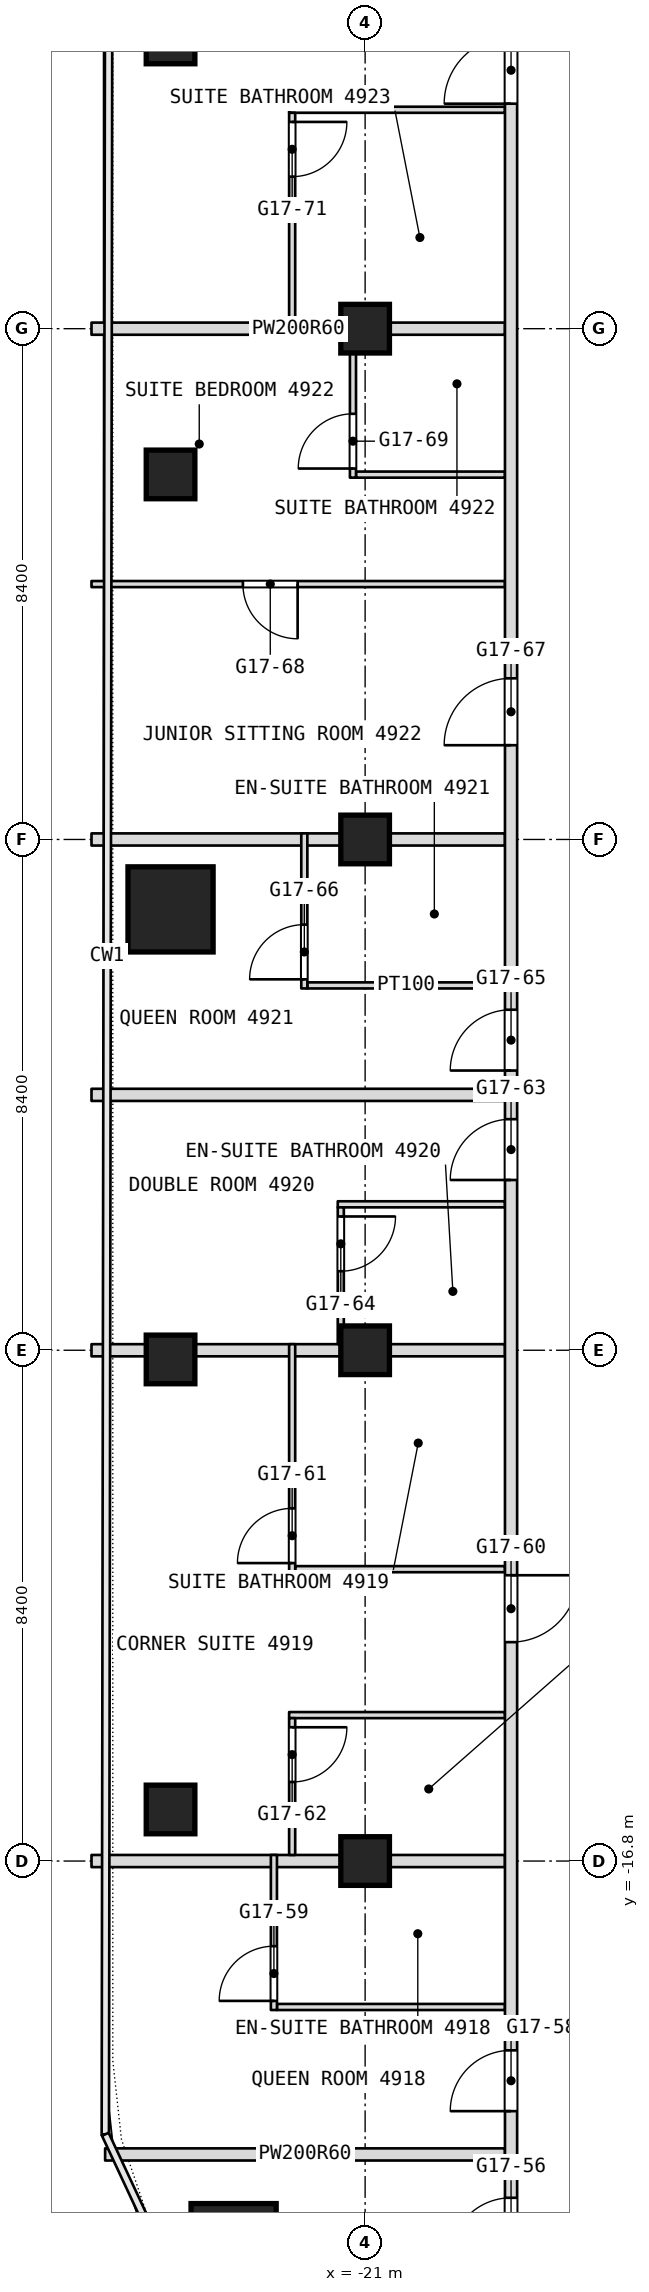
"""IFC4 building model, lengths in metres.
Left out: names, types, materials, properties, quantities, classifications, styles, units other than length and angle.
Written with IfcOpenShell. Run it as: python <this file> out.ifc"""

import sys

from ifc_helpers import new_model, si_unit, direction, frame, frame_2d, origin, origin_2d, place, context, subcontext, project, spatial, rectangle, extrude, element, fill, save


model = new_model("IFC4")
c1 = context("Model", 3, precision=1e-05, world=origin(), true_north=direction((0.0, 1.0)))
c2 = subcontext(c1, "Body", "Model", "MODEL_VIEW")
j1 = project(units=[si_unit("LENGTHUNIT", "METRE"), si_unit("PLANEANGLEUNIT", "RADIAN")], contexts=[c1])
p1 = place(None, origin())
s1 = spatial("IfcSite", under=j1, at=p1, CompositionType="ELEMENT")
p2 = place(p1, origin())
s2 = spatial("IfcBuilding", under=s1, at=p2, CompositionType="ELEMENT")
p3 = place(p2, frame((0.0, 0.0, 212.9)))
s3 = spatial("IfcBuildingStorey", under=s2, at=p3, CompositionType="ELEMENT", Elevation=212.9)
for number, where, z_axis, x_axis in (
    (1, (-23.163, -23.133, 0.0), (0.0, 0.0, 1.0), (1.0, 0.0, 0.0)),
    (2, (-24.2, -1.15, 0.0), (0.0, 0.0, 1.0), (1.0, 0.0, 0.0)),
):
    element("IfcColumn", number, at=place(p3, frame(where, z_axis=z_axis, x_axis=x_axis)), inside=s3, PredefinedType="COLUMN", context=c2, shape_type="SweptSolid", body=[
        extrude(rectangle(XDim=1.4, YDim=1.4, at=origin_2d()), origin(), (0.0, 0.0, 1.0), 3.6),
    ])
for number, where, z_axis, x_axis in (
    (3, (-21.0, -16.8, 0.0), (0.0, 0.0, 1.0), (1.0, 0.0, 0.0)),
    (4, (-21.0, -8.4, 0.0), (0.0, 0.0, 1.0), (1.0, 0.0, 0.0)),
    (5, (-21.0, 0.0, 0.0), (0.0, 0.0, 1.0), (1.0, 0.0, 0.0)),
    (6, (-21.0, 8.4, 0.0), (0.0, 0.0, 1.0), (1.0, 0.0, 0.0)),
    (7, (-24.2, -15.952, 0.0), (0.0, 0.0, 1.0), (1.0, 0.0, 0.0)),
    (8, (-24.2, -8.551, 0.0), (0.0, 0.0, 1.0), (1.0, 0.0, 0.0)),
    (9, (-24.2, 6.003, 0.0), (0.0, 0.0, 1.0), (1.0, 0.0, 0.0)),
    (10, (-24.2, 13.156, 0.0), (0.0, 0.0, 1.0), (1.0, 0.0, 0.0)),
):
    element("IfcColumn", number, at=place(p3, frame(where, z_axis=z_axis, x_axis=x_axis)), inside=s3, PredefinedType="COLUMN", context=c2, shape_type="SweptSolid", body=[
        extrude(rectangle(XDim=0.8, YDim=0.8, at=origin_2d()), origin(), (0.0, 0.0, 1.0), 3.6),
    ])
p4 = place(p3, frame((-25.276, -21.625, 0.0), z_axis=(0.0, 0.0, 1.0), x_axis=(1.0, 0.0, 0.0)))
e11 = element("IfcWall", 11, at=p4, inside=s3, PredefinedType="PARTITIONING", context=c2, shape_type="SweptSolid", body=[
    extrude(rectangle(XDim=6.576, YDim=0.2, at=frame_2d((3.288, 0.0))), origin(), (0.0, 0.0, 1.0), 3.34),
])
p5 = place(p3, frame((-22.45, -19.2, 0.0), z_axis=(0.0, 0.0, 1.0), x_axis=(1.0, 0.0, 0.0)))
e12 = element("IfcWall", 12, at=p5, inside=s3, PredefinedType="PARTITIONING", context=c2, shape_type="SweptSolid", body=[
    extrude(rectangle(XDim=3.75, YDim=0.1, at=frame_2d((1.875, 0.0))), origin(), (0.0, 0.0, 1.0), 3.34),
])
p6 = place(p3, frame((-25.5, -16.8, 0.0), z_axis=(0.0, 0.0, 1.0), x_axis=(1.0, 0.0, 0.0)))
e13 = element("IfcWall", 13, at=p6, inside=s3, PredefinedType="PARTITIONING", context=c2, shape_type="SweptSolid", body=[
    extrude(rectangle(XDim=6.8, YDim=0.2, at=frame_2d((3.4, 0.0))), origin(), (0.0, 0.0, 1.0), 2.94),
])
p7 = place(p3, frame((-22.25, -14.4, 0.0), z_axis=(0.0, 0.0, 1.0), x_axis=(1.0, 0.0, 0.0)))
e14 = element("IfcWall", 14, at=p7, inside=s3, PredefinedType="PARTITIONING", context=c2, shape_type="SweptSolid", body=[
    extrude(rectangle(XDim=3.55, YDim=0.1, at=frame_2d((1.775, 0.0))), origin(), (0.0, 0.0, 1.0), 3.34),
])
p8 = place(p3, frame((-22.15, -12.0, 0.0), z_axis=(0.0, 0.0, 1.0), x_axis=(1.0, 0.0, 0.0)))
e15 = element("IfcWall", 15, at=p8, inside=s3, PredefinedType="PARTITIONING", context=c2, shape_type="SweptSolid", body=[
    extrude(rectangle(XDim=3.45, YDim=0.1, at=frame_2d((1.725, 0.0))), origin(), (0.0, 0.0, 1.0), 3.34),
])
p9 = place(p3, frame((-25.5, -8.4, 0.0), z_axis=(0.0, 0.0, 1.0), x_axis=(1.0, 0.0, 0.0)))
e16 = element("IfcWall", 16, at=p9, inside=s3, PredefinedType="PARTITIONING", context=c2, shape_type="SweptSolid", body=[
    extrude(rectangle(XDim=6.8, YDim=0.2, at=frame_2d((3.4, 0.0))), origin(), (0.0, 0.0, 1.0), 2.94),
])
p10 = place(p3, frame((-21.45, -6.0, 0.0), z_axis=(0.0, 0.0, 1.0), x_axis=(1.0, 0.0, 0.0)))
e17 = element("IfcWall", 17, at=p10, inside=s3, PredefinedType="PARTITIONING", context=c2, shape_type="SweptSolid", body=[
    extrude(rectangle(XDim=2.75, YDim=0.1, at=frame_2d((1.375, 0.0))), origin(), (0.0, 0.0, 1.0), 3.34),
])
p11 = place(p3, frame((-25.5, -4.2, 0.0), z_axis=(0.0, 0.0, 1.0), x_axis=(1.0, 0.0, 0.0)))
e18 = element("IfcWall", 18, at=p11, inside=s3, PredefinedType="PARTITIONING", context=c2, shape_type="SweptSolid", body=[
    extrude(rectangle(XDim=6.8, YDim=0.2, at=frame_2d((3.4, 0.0))), origin(), (0.0, 0.0, 1.0), 3.34),
])
p12 = place(p3, frame((-21.95, -2.4, 0.0), z_axis=(0.0, 0.0, 1.0), x_axis=(1.0, 0.0, 0.0)))
e19 = element("IfcWall", 19, at=p12, inside=s3, PredefinedType="PARTITIONING", context=c2, shape_type="SweptSolid", body=[
    extrude(rectangle(XDim=3.25, YDim=0.1, at=frame_2d((1.625, 0.0))), origin(), (0.0, 0.0, 1.0), 3.34),
])
p13 = place(p3, frame((-25.5, 0.0, 0.0), z_axis=(0.0, 0.0, 1.0), x_axis=(1.0, 0.0, 0.0)))
e20 = element("IfcWall", 20, at=p13, inside=s3, PredefinedType="PARTITIONING", context=c2, shape_type="SweptSolid", body=[
    extrude(rectangle(XDim=6.8, YDim=0.2, at=frame_2d((3.4, 0.0))), origin(), (0.0, 0.0, 1.0), 2.94),
])
p14 = place(p3, frame((-25.5, 4.2, 0.0), z_axis=(0.0, 0.0, 1.0), x_axis=(1.0, 0.0, 0.0)))
e21 = element("IfcWall", 21, at=p14, inside=s3, PredefinedType="PARTITIONING", context=c2, shape_type="SweptSolid", body=[
    extrude(rectangle(XDim=6.8, YDim=0.1, at=frame_2d((3.4, 0.0))), origin(), (0.0, 0.0, 1.0), 3.34),
])
p15 = place(p14, frame((2.49, 0.0, 0.0)))
e22 = element("IfcOpeningElement", 22, at=p15, cuts=e21, PredefinedType="OPENING", context=c2, shape_type="SweptSolid", body=[
    extrude(rectangle(XDim=0.9, YDim=2.1, at=frame_2d((0.45, 1.05))), frame((0.0, 0.05, 0.0), z_axis=(0.0, -1.0, 0.0), x_axis=(1.0, 0.0, 0.0)), (0.0, 0.0, 1.0), 0.1),
])
p16 = place(p3, frame((-21.15, 6.0, 0.0), z_axis=(0.0, 0.0, 1.0), x_axis=(1.0, 0.0, 0.0)))
e23 = element("IfcWall", 23, at=p16, inside=s3, PredefinedType="PARTITIONING", context=c2, shape_type="SweptSolid", body=[
    extrude(rectangle(XDim=2.45, YDim=0.1, at=frame_2d((1.225, 0.0))), origin(), (0.0, 0.0, 1.0), 3.34),
])
p17 = place(p3, frame((-25.5, 8.4, 0.0), z_axis=(0.0, 0.0, 1.0), x_axis=(1.0, 0.0, 0.0)))
e24 = element("IfcWall", 24, at=p17, inside=s3, PredefinedType="PARTITIONING", context=c2, shape_type="SweptSolid", body=[
    extrude(rectangle(XDim=6.8, YDim=0.2, at=frame_2d((3.4, 0.0))), origin(), (0.0, 0.0, 1.0), 2.94),
])
p18 = place(p3, frame((-22.25, 12.0, 0.0), z_axis=(0.0, 0.0, 1.0), x_axis=(1.0, 0.0, 0.0)))
e25 = element("IfcWall", 25, at=p18, inside=s3, PredefinedType="PARTITIONING", context=c2, shape_type="SweptSolid", body=[
    extrude(rectangle(XDim=3.55, YDim=0.1, at=frame_2d((1.775, 0.0))), origin(), (0.0, 0.0, 1.0), 3.34),
])
p19 = place(p3, frame((-18.6, -26.751, 0.0), z_axis=(0.0, 0.0, 1.0), x_axis=(0.0, 1.0, 0.0)))
e26 = element("IfcWall", 26, at=p19, inside=s3, PredefinedType="PARTITIONING", context=c2, shape_type="SweptSolid", body=[
    extrude(rectangle(XDim=49.091, YDim=0.2, at=frame_2d((24.545, 0.0))), origin(), (0.0, 0.0, 1.0), 3.34),
])
p20 = place(p19, frame((3.413, 0.0, 0.0)))
e27 = element("IfcOpeningElement", 27, at=p20, cuts=e26, PredefinedType="OPENING", context=c2, shape_type="SweptSolid", body=[
    extrude(rectangle(XDim=1.0, YDim=2.1, at=frame_2d((0.5, 1.05))), frame((0.0, 0.1, 0.0), z_axis=(0.0, -1.0, 0.0), x_axis=(1.0, 0.0, 0.0)), (0.0, 0.0, 1.0), 0.2),
])
p21 = place(p19, frame((5.838, 0.0, 0.0)))
e28 = element("IfcOpeningElement", 28, at=p21, cuts=e26, PredefinedType="OPENING", context=c2, shape_type="SweptSolid", body=[
    extrude(rectangle(XDim=1.0, YDim=2.1, at=frame_2d((0.5, 1.05))), frame((0.0, 0.1, 0.0), z_axis=(0.0, -1.0, 0.0), x_axis=(1.0, 0.0, 0.0)), (0.0, 0.0, 1.0), 0.2),
])
p22 = place(p19, frame((13.551, 0.0, 0.0)))
e29 = element("IfcOpeningElement", 29, at=p22, cuts=e26, PredefinedType="OPENING", context=c2, shape_type="SweptSolid", body=[
    extrude(rectangle(XDim=1.1, YDim=2.1, at=frame_2d((0.55, 1.05))), frame((0.0, 0.1, 0.0), z_axis=(0.0, -1.0, 0.0), x_axis=(1.0, 0.0, 0.0)), (0.0, 0.0, 1.0), 0.2),
])
p23 = place(p19, frame((21.151, 0.0, 0.0)))
e30 = element("IfcOpeningElement", 30, at=p23, cuts=e26, PredefinedType="OPENING", context=c2, shape_type="SweptSolid", body=[
    extrude(rectangle(XDim=1.0, YDim=2.1, at=frame_2d((0.5, 1.05))), frame((0.0, 0.1, 0.0), z_axis=(0.0, -1.0, 0.0), x_axis=(1.0, 0.0, 0.0)), (0.0, 0.0, 1.0), 0.2),
])
p24 = place(p19, frame((22.951, 0.0, 0.0)))
e31 = element("IfcOpeningElement", 31, at=p24, cuts=e26, PredefinedType="OPENING", context=c2, shape_type="SweptSolid", body=[
    extrude(rectangle(XDim=1.0, YDim=2.1, at=frame_2d((0.5, 1.05))), frame((0.0, 0.1, 0.0), z_axis=(0.0, -1.0, 0.0), x_axis=(1.0, 0.0, 0.0)), (0.0, 0.0, 1.0), 0.2),
])
p25 = place(p19, frame((28.301, 0.0, 0.0)))
e32 = element("IfcOpeningElement", 32, at=p25, cuts=e26, PredefinedType="OPENING", context=c2, shape_type="SweptSolid", body=[
    extrude(rectangle(XDim=1.1, YDim=2.1, at=frame_2d((0.55, 1.05))), frame((0.0, 0.1, 0.0), z_axis=(0.0, -1.0, 0.0), x_axis=(1.0, 0.0, 0.0)), (0.0, 0.0, 1.0), 0.2),
])
p26 = place(p19, frame((38.851, 0.0, 0.0)))
e33 = element("IfcOpeningElement", 33, at=p26, cuts=e26, PredefinedType="OPENING", context=c2, shape_type="SweptSolid", body=[
    extrude(rectangle(XDim=1.1, YDim=2.1, at=frame_2d((0.55, 1.05))), frame((0.0, 0.1, 0.0), z_axis=(0.0, -1.0, 0.0), x_axis=(1.0, 0.0, 0.0)), (0.0, 0.0, 1.0), 0.2),
])
p27 = place(p19, frame((44.051, 0.0, 0.0)))
e34 = element("IfcOpeningElement", 34, at=p27, cuts=e26, PredefinedType="OPENING", context=c2, shape_type="SweptSolid", body=[
    extrude(rectangle(XDim=1.0, YDim=2.1, at=frame_2d((0.5, 1.05))), frame((0.0, 0.1, 0.0), z_axis=(0.0, -1.0, 0.0), x_axis=(1.0, 0.0, 0.0)), (0.0, 0.0, 1.0), 0.2),
])
p28 = place(p3, frame((-21.2, 5.95, 0.0), z_axis=(0.0, 0.0, 1.0), x_axis=(0.0, 1.0, 0.0)))
e35 = element("IfcWall", 35, at=p28, inside=s3, PredefinedType="PARTITIONING", context=c2, shape_type="SweptSolid", body=[
    extrude(rectangle(XDim=2.55, YDim=0.1, at=frame_2d((1.275, 0.0))), origin(), (0.0, 0.0, 1.0), 3.34),
])
p29 = place(p28, frame((0.15, 0.0, 0.0)))
e36 = element("IfcOpeningElement", 36, at=p29, cuts=e35, PredefinedType="OPENING", context=c2, shape_type="SweptSolid", body=[
    extrude(rectangle(XDim=0.9, YDim=2.1, at=frame_2d((0.45, 1.05))), frame((0.0, 0.05, 0.0), z_axis=(0.0, -1.0, 0.0), x_axis=(1.0, 0.0, 0.0)), (0.0, 0.0, 1.0), 0.1),
])
p30 = place(p3, frame((-21.4, -8.3, 0.0), z_axis=(0.0, 0.0, 1.0), x_axis=(0.0, 1.0, 0.0)))
e37 = element("IfcWall", 37, at=p30, inside=s3, PredefinedType="PARTITIONING", context=c2, shape_type="SweptSolid", body=[
    extrude(rectangle(XDim=2.25, YDim=0.1, at=frame_2d((1.125, 0.0))), origin(), (0.0, 0.0, 1.0), 3.34),
])
p31 = place(p30, frame((1.2, 0.0, 0.0)))
e38 = element("IfcOpeningElement", 38, at=p31, cuts=e37, PredefinedType="OPENING", context=c2, shape_type="SweptSolid", body=[
    extrude(rectangle(XDim=0.9, YDim=2.1, at=frame_2d((0.45, 1.05))), frame((0.0, 0.05, 0.0), z_axis=(0.0, -1.0, 0.0), x_axis=(1.0, 0.0, 0.0)), (0.0, 0.0, 1.0), 0.1),
])
p32 = place(p3, frame((-22.0, -2.45, 0.0), z_axis=(0.0, 0.0, 1.0), x_axis=(0.0, 1.0, 0.0)))
e39 = element("IfcWall", 39, at=p32, inside=s3, PredefinedType="PARTITIONING", context=c2, shape_type="SweptSolid", body=[
    extrude(rectangle(XDim=2.55, YDim=0.1, at=frame_2d((1.275, 0.0))), origin(), (0.0, 0.0, 1.0), 3.34),
])
p33 = place(p32, frame((0.15, 0.0, 0.0)))
e40 = element("IfcOpeningElement", 40, at=p33, cuts=e39, PredefinedType="OPENING", context=c2, shape_type="SweptSolid", body=[
    extrude(rectangle(XDim=0.9, YDim=2.1, at=frame_2d((0.45, 1.05))), frame((0.0, 0.05, 0.0), z_axis=(0.0, -1.0, 0.0), x_axis=(1.0, 0.0, 0.0)), (0.0, 0.0, 1.0), 0.1),
])
p34 = place(p3, frame((-22.2, -16.7, 0.0), z_axis=(0.0, 0.0, 1.0), x_axis=(0.0, 1.0, 0.0)))
e41 = element("IfcWall", 41, at=p34, inside=s3, PredefinedType="PARTITIONING", context=c2, shape_type="SweptSolid", body=[
    extrude(rectangle(XDim=2.25, YDim=0.1, at=frame_2d((1.125, 0.0))), origin(), (0.0, 0.0, 1.0), 3.34),
])
p35 = place(p34, frame((1.2, 0.0, 0.0)))
e42 = element("IfcOpeningElement", 42, at=p35, cuts=e41, PredefinedType="OPENING", context=c2, shape_type="SweptSolid", body=[
    extrude(rectangle(XDim=0.9, YDim=2.1, at=frame_2d((0.45, 1.05))), frame((0.0, 0.05, 0.0), z_axis=(0.0, -1.0, 0.0), x_axis=(1.0, 0.0, 0.0)), (0.0, 0.0, 1.0), 0.1),
])
p36 = place(p3, frame((-22.2, -12.05, 0.0), z_axis=(0.0, 0.0, 1.0), x_axis=(0.0, 1.0, 0.0)))
e43 = element("IfcWall", 43, at=p36, inside=s3, PredefinedType="PARTITIONING", context=c2, shape_type="SweptSolid", body=[
    extrude(rectangle(XDim=3.75, YDim=0.1, at=frame_2d((1.875, 0.0))), origin(), (0.0, 0.0, 1.0), 3.34),
])
p37 = place(p36, frame((0.15, 0.0, 0.0)))
e44 = element("IfcOpeningElement", 44, at=p37, cuts=e43, PredefinedType="OPENING", context=c2, shape_type="SweptSolid", body=[
    extrude(rectangle(XDim=0.9, YDim=2.1, at=frame_2d((0.45, 1.05))), frame((0.0, 0.05, 0.0), z_axis=(0.0, -1.0, 0.0), x_axis=(1.0, 0.0, 0.0)), (0.0, 0.0, 1.0), 0.1),
])
p38 = place(p3, frame((-22.2, 8.5, 0.0), z_axis=(0.0, 0.0, 1.0), x_axis=(0.0, 1.0, 0.0)))
e45 = element("IfcWall", 45, at=p38, inside=s3, PredefinedType="PARTITIONING", context=c2, shape_type="SweptSolid", body=[
    extrude(rectangle(XDim=3.45, YDim=0.1, at=frame_2d((1.725, 0.0))), origin(), (0.0, 0.0, 1.0), 3.34),
])
p39 = place(p38, frame((2.4, 0.0, 0.0)))
e46 = element("IfcOpeningElement", 46, at=p39, cuts=e45, PredefinedType="OPENING", context=c2, shape_type="SweptSolid", body=[
    extrude(rectangle(XDim=0.9, YDim=2.1, at=frame_2d((0.45, 1.05))), frame((0.0, 0.05, 0.0), z_axis=(0.0, -1.0, 0.0), x_axis=(1.0, 0.0, 0.0)), (0.0, 0.0, 1.0), 0.1),
])
p40 = place(p3, frame((-22.5, -19.25, 0.0), z_axis=(0.0, 0.0, 1.0), x_axis=(0.0, 1.0, 0.0)))
e47 = element("IfcWall", 47, at=p40, inside=s3, PredefinedType="PARTITIONING", context=c2, shape_type="SweptSolid", body=[
    extrude(rectangle(XDim=2.55, YDim=0.1, at=frame_2d((1.275, 0.0))), origin(), (0.0, 0.0, 1.0), 3.34),
])
p41 = place(p40, frame((0.15, 0.0, 0.0)))
e48 = element("IfcOpeningElement", 48, at=p41, cuts=e47, PredefinedType="OPENING", context=c2, shape_type="SweptSolid", body=[
    extrude(rectangle(XDim=0.9, YDim=2.1, at=frame_2d((0.45, 1.05))), frame((0.0, 0.05, 0.0), z_axis=(0.0, -1.0, 0.0), x_axis=(1.0, 0.0, 0.0)), (0.0, 0.0, 1.0), 0.1),
])
p42 = place(p15, origin())
e49 = element("IfcDoor", 49, at=p42, inside=s3, OperationType="SINGLE_SWING_LEFT", PredefinedType="DOOR", context=c2, shape_type="SweptSolid", body=[
    extrude(rectangle(XDim=0.9, YDim=2.1, at=frame_2d((0.45, 1.05))), frame((0.0, 0.025, 0.0), z_axis=(0.0, -1.0, 0.0), x_axis=(1.0, 0.0, 0.0)), (0.0, 0.0, 1.0), 0.05),
])
fill(e22, e49)
p43 = place(p20, origin())
e50 = element("IfcDoor", 50, at=p43, inside=s3, OperationType="SINGLE_SWING_LEFT", PredefinedType="DOOR", context=c2, shape_type="SweptSolid", body=[
    extrude(rectangle(XDim=1.0, YDim=2.1, at=frame_2d((0.5, 1.05))), frame((0.0, 0.025, 0.0), z_axis=(0.0, -1.0, 0.0), x_axis=(1.0, 0.0, 0.0)), (0.0, 0.0, 1.0), 0.05),
])
fill(e27, e50)
p44 = place(p21, origin())
e51 = element("IfcDoor", 51, at=p44, inside=s3, OperationType="SINGLE_SWING_LEFT", PredefinedType="DOOR", context=c2, shape_type="SweptSolid", body=[
    extrude(rectangle(XDim=1.0, YDim=2.1, at=frame_2d((0.5, 1.05))), frame((0.0, 0.025, 0.0), z_axis=(0.0, -1.0, 0.0), x_axis=(1.0, 0.0, 0.0)), (0.0, 0.0, 1.0), 0.05),
])
fill(e28, e51)
p45 = place(p22, origin())
e52 = element("IfcDoor", 52, at=p45, inside=s3, OperationType="SINGLE_SWING_RIGHT", PredefinedType="DOOR", context=c2, shape_type="SweptSolid", body=[
    extrude(rectangle(XDim=1.1, YDim=2.1, at=frame_2d((0.55, 1.05))), frame((0.0, 0.025, 0.0), z_axis=(0.0, -1.0, 0.0), x_axis=(1.0, 0.0, 0.0)), (0.0, 0.0, 1.0), 0.05),
])
fill(e29, e52)
p46 = place(p23, origin())
e53 = element("IfcDoor", 53, at=p46, inside=s3, OperationType="SINGLE_SWING_RIGHT", PredefinedType="DOOR", context=c2, shape_type="SweptSolid", body=[
    extrude(rectangle(XDim=1.0, YDim=2.1, at=frame_2d((0.5, 1.05))), frame((0.0, 0.025, 0.0), z_axis=(0.0, -1.0, 0.0), x_axis=(1.0, 0.0, 0.0)), (0.0, 0.0, 1.0), 0.05),
])
fill(e30, e53)
p47 = place(p24, origin())
e54 = element("IfcDoor", 54, at=p47, inside=s3, OperationType="SINGLE_SWING_RIGHT", PredefinedType="DOOR", context=c2, shape_type="SweptSolid", body=[
    extrude(rectangle(XDim=1.0, YDim=2.1, at=frame_2d((0.5, 1.05))), frame((0.0, 0.025, 0.0), z_axis=(0.0, -1.0, 0.0), x_axis=(1.0, 0.0, 0.0)), (0.0, 0.0, 1.0), 0.05),
])
fill(e31, e54)
p48 = place(p25, origin())
e55 = element("IfcDoor", 55, at=p48, inside=s3, OperationType="SINGLE_SWING_RIGHT", PredefinedType="DOOR", context=c2, shape_type="SweptSolid", body=[
    extrude(rectangle(XDim=1.1, YDim=2.1, at=frame_2d((0.55, 1.05))), frame((0.0, 0.025, 0.0), z_axis=(0.0, -1.0, 0.0), x_axis=(1.0, 0.0, 0.0)), (0.0, 0.0, 1.0), 0.05),
])
fill(e32, e55)
p49 = place(p26, origin())
e56 = element("IfcDoor", 56, at=p49, inside=s3, OperationType="SINGLE_SWING_LEFT", PredefinedType="DOOR", context=c2, shape_type="SweptSolid", body=[
    extrude(rectangle(XDim=1.1, YDim=2.1, at=frame_2d((0.55, 1.05))), frame((0.0, 0.025, 0.0), z_axis=(0.0, -1.0, 0.0), x_axis=(1.0, 0.0, 0.0)), (0.0, 0.0, 1.0), 0.05),
])
fill(e33, e56)
p50 = place(p29, origin())
e57 = element("IfcDoor", 57, at=p50, inside=s3, OperationType="SINGLE_SWING_RIGHT", PredefinedType="DOOR", context=c2, shape_type="SweptSolid", body=[
    extrude(rectangle(XDim=0.9, YDim=2.1, at=frame_2d((0.45, 1.05))), frame((0.0, 0.025, 0.0), z_axis=(0.0, -1.0, 0.0), x_axis=(1.0, 0.0, 0.0)), (0.0, 0.0, 1.0), 0.05),
])
fill(e36, e57)
p51 = place(p31, origin())
e58 = element("IfcDoor", 58, at=p51, inside=s3, OperationType="SINGLE_SWING_LEFT", PredefinedType="DOOR", context=c2, shape_type="SweptSolid", body=[
    extrude(rectangle(XDim=0.9, YDim=2.1, at=frame_2d((0.45, 1.05))), frame((0.0, 0.025, 0.0), z_axis=(0.0, -1.0, 0.0), x_axis=(1.0, 0.0, 0.0)), (0.0, 0.0, 1.0), 0.05),
])
fill(e38, e58)
p52 = place(p33, origin())
e59 = element("IfcDoor", 59, at=p52, inside=s3, OperationType="SINGLE_SWING_RIGHT", PredefinedType="DOOR", context=c2, shape_type="SweptSolid", body=[
    extrude(rectangle(XDim=0.9, YDim=2.1, at=frame_2d((0.45, 1.05))), frame((0.0, 0.025, 0.0), z_axis=(0.0, -1.0, 0.0), x_axis=(1.0, 0.0, 0.0)), (0.0, 0.0, 1.0), 0.05),
])
fill(e40, e59)
p53 = place(p35, origin())
e60 = element("IfcDoor", 60, at=p53, inside=s3, OperationType="SINGLE_SWING_LEFT", PredefinedType="DOOR", context=c2, shape_type="SweptSolid", body=[
    extrude(rectangle(XDim=0.9, YDim=2.1, at=frame_2d((0.45, 1.05))), frame((0.0, 0.025, 0.0), z_axis=(0.0, -1.0, 0.0), x_axis=(1.0, 0.0, 0.0)), (0.0, 0.0, 1.0), 0.05),
])
fill(e42, e60)
p54 = place(p37, origin())
e61 = element("IfcDoor", 61, at=p54, inside=s3, OperationType="SINGLE_SWING_RIGHT", PredefinedType="DOOR", context=c2, shape_type="SweptSolid", body=[
    extrude(rectangle(XDim=0.9, YDim=2.1, at=frame_2d((0.45, 1.05))), frame((0.0, 0.025, 0.0), z_axis=(0.0, -1.0, 0.0), x_axis=(1.0, 0.0, 0.0)), (0.0, 0.0, 1.0), 0.05),
])
fill(e44, e61)
p55 = place(p39, origin())
e62 = element("IfcDoor", 62, at=p55, inside=s3, OperationType="SINGLE_SWING_LEFT", PredefinedType="DOOR", context=c2, shape_type="SweptSolid", body=[
    extrude(rectangle(XDim=0.9, YDim=2.1, at=frame_2d((0.45, 1.05))), frame((0.0, 0.025, 0.0), z_axis=(0.0, -1.0, 0.0), x_axis=(1.0, 0.0, 0.0)), (0.0, 0.0, 1.0), 0.05),
])
fill(e46, e62)
p56 = place(p41, origin())
e63 = element("IfcDoor", 63, at=p56, inside=s3, OperationType="SINGLE_SWING_RIGHT", PredefinedType="DOOR", context=c2, shape_type="SweptSolid", body=[
    extrude(rectangle(XDim=0.9, YDim=2.1, at=frame_2d((0.45, 1.05))), frame((0.0, 0.025, 0.0), z_axis=(0.0, -1.0, 0.0), x_axis=(1.0, 0.0, 0.0)), (0.0, 0.0, 1.0), 0.05),
])
fill(e48, e63)
save(model, sys.argv[1])
